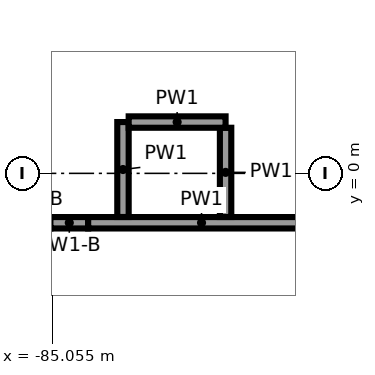
"""IFC4 building model, lengths in metres.
Left out: names, types, materials, properties, quantities, classifications, styles, units other than length and angle.
Written with IfcOpenShell. Run it as: python <this file> out.ifc"""

import sys

from ifc_helpers import new_model, si_unit, direction, frame, frame_2d, origin, place, context, subcontext, project, spatial, rectangle, extrude, element, save


model = new_model("IFC4")
c1 = context("Model", 3, precision=1e-05, world=origin(), true_north=direction((0.0, 1.0)))
c2 = subcontext(c1, "Body", "Model", "MODEL_VIEW")
j1 = project(units=[si_unit("LENGTHUNIT", "METRE"), si_unit("PLANEANGLEUNIT", "RADIAN")], contexts=[c1])
p1 = place(None, origin())
s1 = spatial("IfcSite", under=j1, at=p1, CompositionType="ELEMENT")
p2 = place(p1, origin())
s2 = spatial("IfcBuilding", under=s1, at=p2, CompositionType="ELEMENT")
p3 = place(p2, frame((0.0, 0.0, -4.0)))
s3 = spatial("IfcBuildingStorey", under=s2, at=p3, CompositionType="ELEMENT", Elevation=-4.0)
p4 = place(p3, frame((-85.08, -0.65, 0.0), z_axis=(0.0, 0.0, 1.0), x_axis=(1.0, 0.0, 0.0)))
e1 = element("IfcWall", 1, at=p4, inside=s3, PredefinedType="PARTITIONING", context=c2, shape_type="SweptSolid", body=[
    extrude(rectangle(XDim=0.497, YDim=0.15, at=frame_2d((0.249, 0.0))), origin(), (0.0, 0.0, 1.0), 2.5),
])
p5 = place(p3, frame((-84.583, -0.65, 0.0), z_axis=(0.0, 0.0, 1.0), x_axis=(1.0, 0.0, 0.0)))
e2 = element("IfcWall", 2, at=p5, inside=s3, PredefinedType="PARTITIONING", context=c2, shape_type="SweptSolid", body=[
    extrude(rectangle(XDim=2.983, YDim=0.15, at=frame_2d((1.491, 0.0))), origin(), (0.0, 0.0, 1.0), 3.6),
])
p6 = place(p3, frame((-84.125, 0.675, 0.0), z_axis=(0.0, 0.0, 1.0), x_axis=(0.0, -1.0, 0.0)))
e3 = element("IfcWall", 3, at=p6, inside=s3, PredefinedType="PARTITIONING", context=c2, shape_type="SweptSolid", body=[
    extrude(rectangle(XDim=1.249, YDim=0.15, at=frame_2d((0.625, 0.0))), origin(), (0.0, 0.0, 1.0), 3.6),
])
p7 = place(p3, frame((-82.775, -0.574, 0.0), z_axis=(0.0, 0.0, 1.0), x_axis=(0.0, 1.0, 0.0)))
e4 = element("IfcWall", 4, at=p7, inside=s3, PredefinedType="PARTITIONING", context=c2, shape_type="SweptSolid", body=[
    extrude(rectangle(XDim=1.174, YDim=0.15, at=frame_2d((0.587, 0.0))), origin(), (0.0, 0.0, 1.0), 3.6),
])
p8 = place(p3, frame((-82.775, 0.675, 0.0), z_axis=(0.0, 0.0, 1.0), x_axis=(-1.0, 0.0, 0.0)))
e5 = element("IfcWall", 5, at=p8, inside=s3, PredefinedType="PARTITIONING", context=c2, shape_type="SweptSolid", body=[
    extrude(rectangle(XDim=1.275, YDim=0.15, at=frame_2d((0.638, 0.0))), origin(), (0.0, 0.0, 1.0), 3.6),
])
save(model, sys.argv[1])
